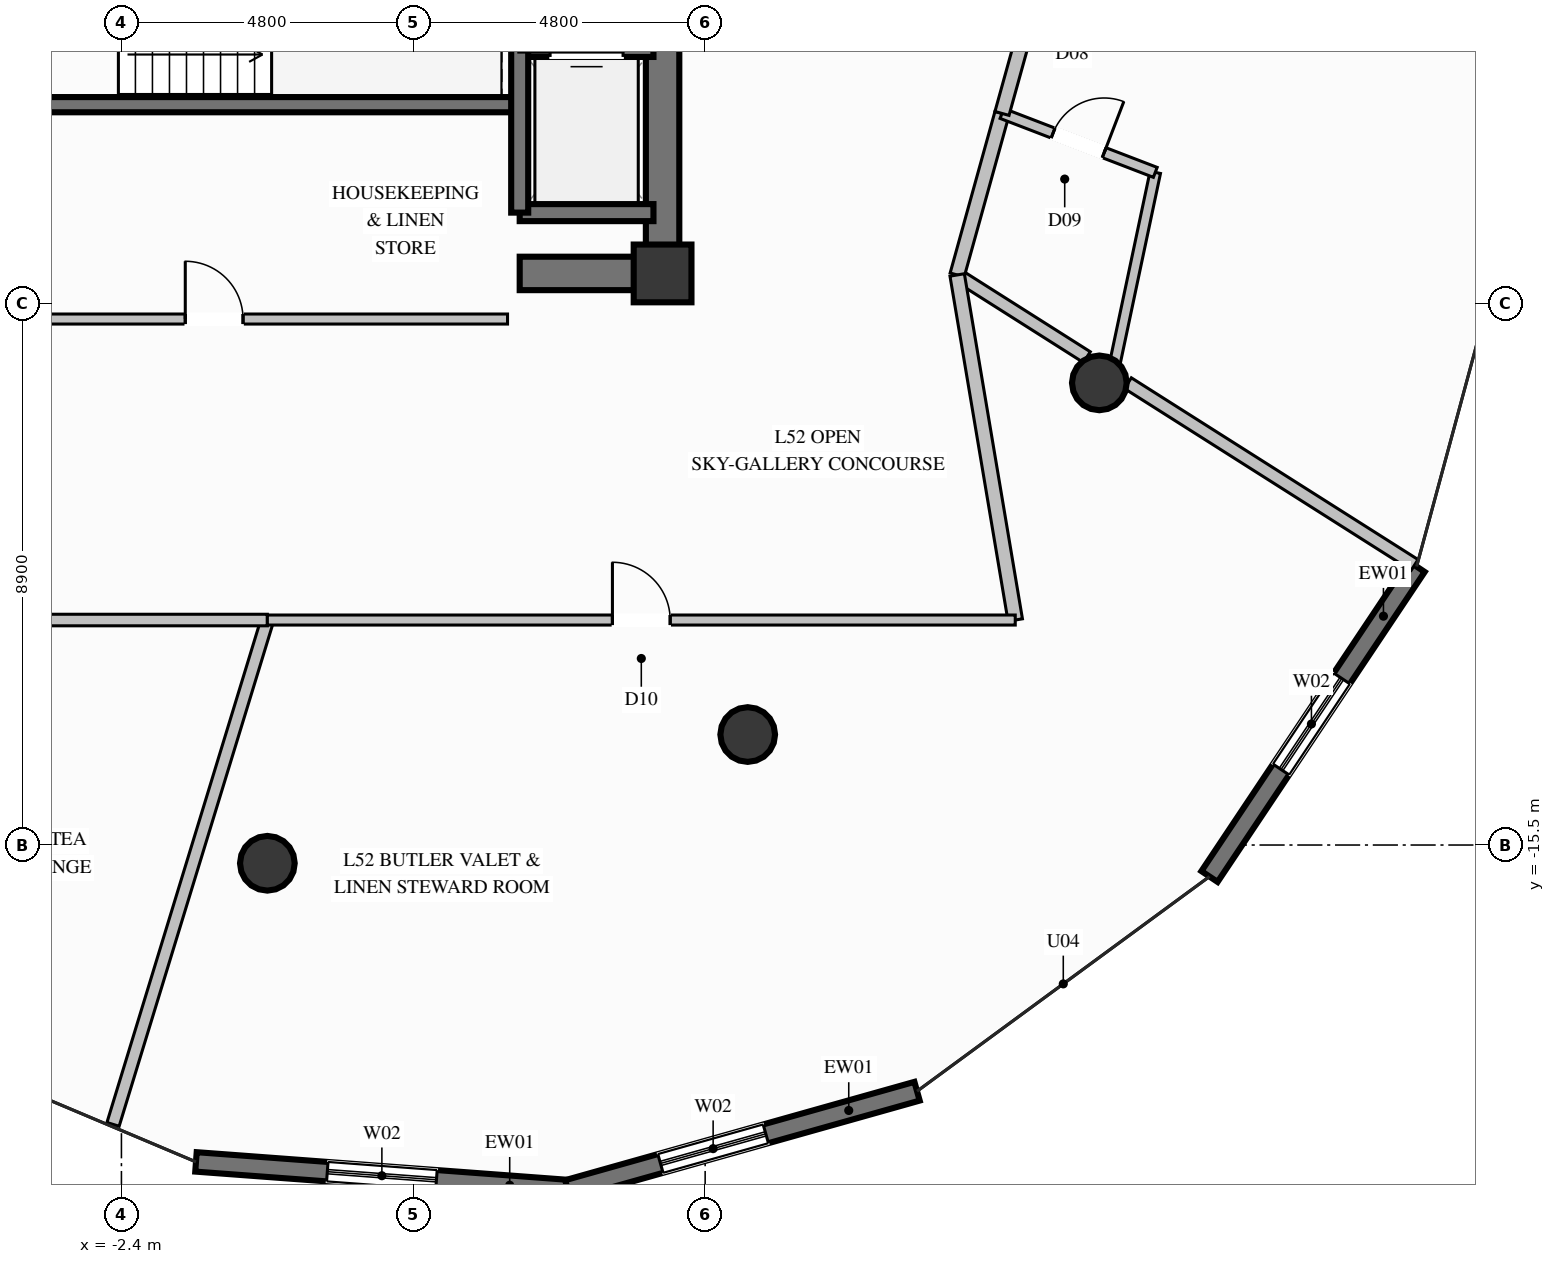
"""IFC4 building model, lengths in metres.
Left out: names, types, materials, properties, quantities, classifications, styles, units other than length and angle.
Written with IfcOpenShell. Run it as: python <this file> out.ifc"""

import sys

from ifc_helpers import new_model, si_unit, direction, frame, frame_2d, origin, origin_2d, place, context, subcontext, project, spatial, rectangle, circle, extrude, element, fill, save


model = new_model("IFC4")
c1 = context("Model", 3, precision=1e-05, world=origin(), true_north=direction((0.0, 1.0)))
c2 = subcontext(c1, "Body", "Model", "MODEL_VIEW")
j1 = project(units=[si_unit("LENGTHUNIT", "METRE"), si_unit("PLANEANGLEUNIT", "RADIAN")], contexts=[c1])
p1 = place(None, origin())
s1 = spatial("IfcSite", under=j1, at=p1, CompositionType="ELEMENT")
p2 = place(p1, origin())
s2 = spatial("IfcBuilding", under=s1, at=p2, CompositionType="ELEMENT")
p3 = place(p2, frame((0.0, 0.0, 202.0)))
s3 = spatial("IfcBuildingStorey", under=s2, at=p3, CompositionType="ELEMENT", Elevation=202.0)
p4 = place(p3, frame((6.5, -6.1, 0.0), z_axis=(0.0, 0.0, 1.0), x_axis=(1.0, 0.0, 0.0)))
e1 = element("IfcColumn", 1, at=p4, inside=s3, PredefinedType="COLUMN", context=c2, shape_type="SweptSolid", body=[
    extrude(rectangle(XDim=0.95, YDim=0.95, at=origin_2d()), origin(), (0.0, 0.0, 1.0), 3.6),
])
p5 = place(p3, frame((-4.13, -3.325, 0.0), z_axis=(0.0, 0.0, 1.0), x_axis=(1.0, 0.0, 0.0)))
e2 = element("IfcWall", 2, at=p5, inside=s3, PredefinedType="SOLIDWALL", context=c2, shape_type="SweptSolid", body=[
    extrude(rectangle(XDim=8.26, YDim=0.25, at=frame_2d((4.13, 0.0))), origin(), (0.0, 0.0, 1.0), 3.6),
])
p6 = place(p3, frame((4.15, -6.1, 0.0), z_axis=(0.0, 0.0, 1.0), x_axis=(1.0, 0.0, 0.0)))
e3 = element("IfcWall", 3, at=p6, inside=s3, PredefinedType="SHEAR", context=c2, shape_type="SweptSolid", body=[
    extrude(rectangle(XDim=2.075, YDim=0.55, at=frame_2d((1.038, 0.0))), origin(), (0.0, 0.0, 1.0), 3.6),
])
p7 = place(p3, frame((6.5, -6.375, 0.0), z_axis=(0.0, 0.0, 1.0), x_axis=(0.0, 1.0, 0.0)))
e4 = element("IfcWall", 4, at=p7, inside=s3, PredefinedType="SHEAR", context=c2, shape_type="SweptSolid", body=[
    extrude(rectangle(XDim=4.025, YDim=0.55, at=frame_2d((2.012, 0.0))), origin(), (0.0, 0.0, 1.0), 3.6),
])
for number, where, z_axis, x_axis in (
    (5, (0.0, -15.8, 0.0), (0.0, 0.0, 1.0), (1.0, 0.0, 0.0)),
    (6, (7.9, -13.683, 0.0), (0.0, 0.0, 1.0), (1.0, 0.0, 0.0)),
    (7, (13.683, -7.9, 0.0), (0.0, 0.0, 1.0), (1.0, 0.0, 0.0)),
):
    element("IfcColumn", number, at=place(p3, frame(where, z_axis=z_axis, x_axis=x_axis)), inside=s3, PredefinedType="COLUMN", context=c2, shape_type="SweptSolid", body=[
        extrude(circle(Radius=0.45, at=origin_2d()), origin(), (0.0, 0.0, 1.0), 3.6),
    ])
p8 = place(p3, frame((18.901, -10.92, 0.0), z_axis=(0.0, 0.0, 1.0), x_axis=(-0.55549022161, -0.831523068649, 0.0)))
e8 = element("IfcWall", 8, at=p8, inside=s3, PredefinedType="SOLIDWALL", context=c2, shape_type="SweptSolid", body=[
    extrude(rectangle(XDim=6.131, YDim=0.32, at=frame_2d((3.065, 0.0))), origin(), (0.0, 0.0, 1.0), 3.36),
])
p9 = place(p8, frame((2.214, 0.0, 0.35)))
e9 = element("IfcOpeningElement", 9, at=p9, cuts=e8, PredefinedType="OPENING", context=c2, shape_type="SweptSolid", body=[
    extrude(rectangle(XDim=1.8, YDim=2.6, at=frame_2d((0.9, 1.3))), frame((0.0, 0.17, 0.0), z_axis=(0.0, -1.0, 0.0), x_axis=(1.0, 0.0, 0.0)), (0.0, 0.0, 1.0), 0.34),
])
p10 = place(p3, frame((4.941, -21.166, 0.0), z_axis=(0.0, 0.0, 1.0), x_axis=(-0.997242274748, 0.074214860068, 0.0)))
e10 = element("IfcWall", 10, at=p10, inside=s3, PredefinedType="SOLIDWALL", context=c2, shape_type="SweptSolid", body=[
    extrude(rectangle(XDim=6.132, YDim=0.32, at=frame_2d((3.066, 0.0))), origin(), (0.0, 0.0, 1.0), 3.36),
])
p11 = place(p10, frame((2.166, 0.0, 0.35)))
e11 = element("IfcOpeningElement", 11, at=p11, cuts=e10, PredefinedType="OPENING", context=c2, shape_type="SweptSolid", body=[
    extrude(rectangle(XDim=1.8, YDim=2.6, at=frame_2d((0.9, 1.3))), frame((0.0, 0.17, 0.0), z_axis=(0.0, -1.0, 0.0), x_axis=(1.0, 0.0, 0.0)), (0.0, 0.0, 1.0), 0.34),
])
p12 = place(p3, frame((10.685, -19.549, 0.0), z_axis=(0.0, 0.0, 1.0), x_axis=(-0.962589602237, -0.270963572578, 0.0)))
e12 = element("IfcWall", 12, at=p12, inside=s3, PredefinedType="SOLIDWALL", context=c2, shape_type="SweptSolid", body=[
    extrude(rectangle(XDim=5.967, YDim=0.32, at=frame_2d((2.984, 0.0))), origin(), (0.0, 0.0, 1.0), 3.36),
])
p13 = place(p12, frame((2.584, 0.0, 0.35)))
e13 = element("IfcOpeningElement", 13, at=p13, cuts=e12, PredefinedType="OPENING", context=c2, shape_type="SweptSolid", body=[
    extrude(rectangle(XDim=1.8, YDim=2.6, at=frame_2d((0.9, 1.3))), frame((0.0, 0.17, 0.0), z_axis=(0.0, -1.0, 0.0), x_axis=(1.0, 0.0, 0.0)), (0.0, 0.0, 1.0), 0.34),
])
p14 = place(p3, frame((4.15, -5.1, 0.0), z_axis=(0.0, 0.0, 1.0), x_axis=(1.0, 0.0, 0.0)))
e14 = element("IfcWall", 14, at=p14, inside=s3, PredefinedType="SOLIDWALL", context=c2, shape_type="SweptSolid", body=[
    extrude(rectangle(XDim=2.2, YDim=0.28, at=frame_2d((1.1, 0.0))), origin(), (0.0, 0.0, 1.0), 3.36),
])
p15 = place(p3, frame((6.35, -2.4, 0.0), z_axis=(0.0, 0.0, 1.0), x_axis=(-1.0, 0.0, 0.0)))
e15 = element("IfcWall", 15, at=p15, inside=s3, PredefinedType="SOLIDWALL", context=c2, shape_type="SweptSolid", body=[
    extrude(rectangle(XDim=2.2, YDim=0.28, at=frame_2d((1.1, 0.0))), origin(), (0.0, 0.0, 1.0), 3.36),
])
p16 = place(p15, frame((0.5, 0.0, 0.0)))
e16 = element("IfcOpeningElement", 16, at=p16, cuts=e15, PredefinedType="OPENING", context=c2, shape_type="SweptSolid", body=[
    extrude(rectangle(XDim=1.2, YDim=2.2, at=frame_2d((0.6, 1.1))), frame((0.0, 0.15, 0.0), z_axis=(0.0, -1.0, 0.0), x_axis=(1.0, 0.0, 0.0)), (0.0, 0.0, 1.0), 0.3),
])
p17 = place(p3, frame((4.15, -2.4, 0.0), z_axis=(0.0, 0.0, 1.0), x_axis=(0.0, -1.0, 0.0)))
e17 = element("IfcWall", 17, at=p17, inside=s3, PredefinedType="SOLIDWALL", context=c2, shape_type="SweptSolid", body=[
    extrude(rectangle(XDim=2.7, YDim=0.28, at=frame_2d((1.35, 0.0))), origin(), (0.0, 0.0, 1.0), 3.36),
])
p18 = place(p3, frame((-5.7, -6.85, 0.0), z_axis=(0.0, 0.0, 1.0), x_axis=(1.0, 0.0, 0.0)))
e18 = element("IfcWall", 18, at=p18, inside=s3, PredefinedType="PARTITIONING", context=c2, shape_type="SweptSolid", body=[
    extrude(rectangle(XDim=9.65, YDim=0.165, at=frame_2d((4.825, 0.0))), origin(), (0.0, 0.0, 1.0), 2.445),
])
p19 = place(p18, frame((4.35, 0.0, 0.0)))
e19 = element("IfcOpeningElement", 19, at=p19, cuts=e18, PredefinedType="OPENING", context=c2, shape_type="SweptSolid", body=[
    extrude(rectangle(XDim=0.95, YDim=2.1, at=frame_2d((0.475, 1.05))), frame((0.0, 0.093, 0.0), z_axis=(0.0, -1.0, 0.0), x_axis=(1.0, 0.0, 0.0)), (0.0, 0.0, 1.0), 0.185),
])
p20 = place(p3, frame((11.345, -6.125, 0.0), z_axis=(0.0, 0.0, 1.0), x_axis=(0.844619463995, -0.535367127344, 0.0)))
e20 = element("IfcWall", 20, at=p20, inside=s3, PredefinedType="PARTITIONING", context=c2, shape_type="SweptSolid", body=[
    extrude(rectangle(XDim=2.525, YDim=0.21, at=frame_2d((1.263, 0.0))), origin(), (0.0, 0.0, 1.0), 2.801),
])
p21 = place(p3, frame((14.153, -7.905, 0.0), z_axis=(0.0, 0.0, 1.0), x_axis=(0.844580451792, -0.535428669806, 0.0)))
e21 = element("IfcWall", 21, at=p21, inside=s3, PredefinedType="PARTITIONING", context=c2, shape_type="SweptSolid", body=[
    extrude(rectangle(XDim=5.583, YDim=0.21, at=frame_2d((2.791, 0.0))), origin(), (0.0, 0.0, 1.0), 3.36),
])
p22 = place(p3, frame((11.345, -6.125, 0.0), z_axis=(0.0, 0.0, 1.0), x_axis=(0.267401739017, 0.963585133743, 0.0)))
e22 = element("IfcWall", 22, at=p22, inside=s3, PredefinedType="PARTITIONING", context=c2, shape_type="SweptSolid", body=[
    extrude(rectangle(XDim=2.756, YDim=0.24, at=frame_2d((1.378, 0.0))), origin(), (0.0, 0.0, 1.0), 3.36),
])
p23 = place(p3, frame((13.903, -7.746, 0.0), z_axis=(0.0, 0.0, 1.0), x_axis=(0.207003777915, 0.978340143268, 0.0)))
e23 = element("IfcWall", 23, at=p23, inside=s3, PredefinedType="PLUMBINGWALL", context=c2, shape_type="SweptSolid", body=[
    extrude(rectangle(XDim=3.381, YDim=0.175, at=frame_2d((1.691, 0.0))), origin(), (0.0, 0.0, 1.0), 2.929),
])
p24 = place(p3, frame((12.082, -3.469, 0.0), z_axis=(0.0, 0.0, 1.0), x_axis=(0.933422467447, -0.358779176186, 0.0)))
e24 = element("IfcWall", 24, at=p24, inside=s3, PredefinedType="PLUMBINGWALL", context=c2, shape_type="SweptSolid", body=[
    extrude(rectangle(XDim=2.701, YDim=0.175, at=frame_2d((1.351, 0.0))), origin(), (0.0, 0.0, 1.0), 3.36),
])
p25 = place(p24, frame((0.9, 0.0, 0.0)))
e25 = element("IfcOpeningElement", 25, at=p25, cuts=e24, PredefinedType="OPENING", context=c2, shape_type="SweptSolid", body=[
    extrude(rectangle(XDim=0.9, YDim=2.1, at=frame_2d((0.45, 1.05))), frame((0.0, 0.098, 0.0), z_axis=(0.0, -1.0, 0.0), x_axis=(1.0, 0.0, 0.0)), (0.0, 0.0, 1.0), 0.195),
])
p26 = place(p3, frame((12.082, -3.469, 0.0), z_axis=(0.0, 0.0, 1.0), x_axis=(0.267379290897, 0.963591362975, 0.0)))
e26 = element("IfcWall", 26, at=p26, inside=s3, PredefinedType="PARTITIONING", context=c2, shape_type="SweptSolid", body=[
    extrude(rectangle(XDim=3.808, YDim=0.24, at=frame_2d((1.904, 0.0))), origin(), (0.0, 0.0, 1.0), 3.36),
])
p27 = place(p26, frame((1.354, 0.0, 0.0)))
e27 = element("IfcOpeningElement", 27, at=p27, cuts=e26, PredefinedType="OPENING", context=c2, shape_type="SweptSolid", body=[
    extrude(rectangle(XDim=1.1, YDim=2.3, at=frame_2d((0.55, 1.15))), frame((0.0, 0.13, 0.0), z_axis=(0.0, -1.0, 0.0), x_axis=(1.0, 0.0, 0.0)), (0.0, 0.0, 1.0), 0.26),
])
p28 = place(p3, frame((0.0, -11.8, 0.0), z_axis=(0.0, 0.0, 1.0), x_axis=(-0.292621831888, -0.956228248643, 0.0)))
e28 = element("IfcWall", 28, at=p28, inside=s3, PredefinedType="PARTITIONING", context=c2, shape_type="SweptSolid", body=[
    extrude(rectangle(XDim=8.674, YDim=0.21, at=frame_2d((4.337, 0.0))), origin(), (0.0, 0.0, 1.0), 3.36),
])
p29 = place(p3, frame((-12.3, -11.8, 0.0), z_axis=(0.0, 0.0, 1.0), x_axis=(1.0, 0.0, 0.0)))
e29 = element("IfcWall", 29, at=p29, inside=s3, PredefinedType="PARTITIONING", context=c2, shape_type="SweptSolid", body=[
    extrude(rectangle(XDim=12.3, YDim=0.19, at=frame_2d((6.15, 0.0))), origin(), (0.0, 0.0, 1.0), 3.36),
])
p30 = place(p29, frame((5.675, 0.0, 0.0)))
e30 = element("IfcOpeningElement", 30, at=p30, cuts=e29, PredefinedType="OPENING", context=c2, shape_type="SweptSolid", body=[
    extrude(rectangle(XDim=0.95, YDim=2.1, at=frame_2d((0.475, 1.05))), frame((0.0, 0.105, 0.0), z_axis=(0.0, -1.0, 0.0), x_axis=(1.0, 0.0, 0.0)), (0.0, 0.0, 1.0), 0.21),
])
p31 = place(p3, frame((12.3, -11.8, 0.0), z_axis=(0.0, 0.0, 1.0), x_axis=(-0.165960421789, 0.986132414232, 0.0)))
e31 = element("IfcWall", 31, at=p31, inside=s3, PredefinedType="PARTITIONING", context=c2, shape_type="SweptSolid", body=[
    extrude(rectangle(XDim=5.755, YDim=0.24, at=frame_2d((2.877, 0.0))), origin(), (0.0, 0.0, 1.0), 3.36),
])
p32 = place(p3, frame((0.0, -11.8, 0.0), z_axis=(0.0, 0.0, 1.0), x_axis=(1.0, 0.0, 0.0)))
e32 = element("IfcWall", 32, at=p32, inside=s3, PredefinedType="PARTITIONING", context=c2, shape_type="SweptSolid", body=[
    extrude(rectangle(XDim=12.3, YDim=0.165, at=frame_2d((6.15, 0.0))), origin(), (0.0, 0.0, 1.0), 3.36),
])
p33 = place(p32, frame((5.675, 0.0, 0.0)))
e33 = element("IfcOpeningElement", 33, at=p33, cuts=e32, PredefinedType="OPENING", context=c2, shape_type="SweptSolid", body=[
    extrude(rectangle(XDim=0.95, YDim=2.1, at=frame_2d((0.475, 1.05))), frame((0.0, 0.093, 0.0), z_axis=(0.0, -1.0, 0.0), x_axis=(1.0, 0.0, 0.0)), (0.0, 0.0, 1.0), 0.185),
])
p34 = place(p9, origin())
e34 = element("IfcWindow", 34, at=p34, inside=s3, PartitioningType="SINGLE_PANEL", PredefinedType="WINDOW", context=c2, shape_type="SweptSolid", body=[
    extrude(rectangle(XDim=1.8, YDim=2.6, at=frame_2d((0.9, 1.3))), frame((0.0, 0.03, 0.0), z_axis=(0.0, -1.0, 0.0), x_axis=(1.0, 0.0, 0.0)), (0.0, 0.0, 1.0), 0.06),
])
fill(e9, e34)
p35 = place(p11, origin())
e35 = element("IfcWindow", 35, at=p35, inside=s3, PartitioningType="SINGLE_PANEL", PredefinedType="WINDOW", context=c2, shape_type="SweptSolid", body=[
    extrude(rectangle(XDim=1.8, YDim=2.6, at=frame_2d((0.9, 1.3))), frame((0.0, 0.03, 0.0), z_axis=(0.0, -1.0, 0.0), x_axis=(1.0, 0.0, 0.0)), (0.0, 0.0, 1.0), 0.06),
])
fill(e11, e35)
p36 = place(p13, origin())
e36 = element("IfcWindow", 36, at=p36, inside=s3, PartitioningType="SINGLE_PANEL", PredefinedType="WINDOW", context=c2, shape_type="SweptSolid", body=[
    extrude(rectangle(XDim=1.8, YDim=2.6, at=frame_2d((0.9, 1.3))), frame((0.0, 0.03, 0.0), z_axis=(0.0, -1.0, 0.0), x_axis=(1.0, 0.0, 0.0)), (0.0, 0.0, 1.0), 0.06),
])
fill(e13, e36)
p37 = place(p19, origin())
e37 = element("IfcDoor", 37, at=p37, inside=s3, OperationType="SINGLE_SWING_LEFT", PredefinedType="DOOR", context=c2, shape_type="SweptSolid", body=[
    extrude(rectangle(XDim=0.95, YDim=2.1, at=frame_2d((0.475, 1.05))), frame((0.0, 0.025, 0.0), z_axis=(0.0, -1.0, 0.0), x_axis=(1.0, 0.0, 0.0)), (0.0, 0.0, 1.0), 0.05),
])
fill(e19, e37)
p38 = place(p25, origin())
e38 = element("IfcDoor", 38, at=p38, inside=s3, OperationType="SINGLE_SWING_RIGHT", PredefinedType="DOOR", context=c2, shape_type="SweptSolid", body=[
    extrude(rectangle(XDim=0.9, YDim=2.1, at=frame_2d((0.45, 1.05))), frame((0.0, 0.025, 0.0), z_axis=(0.0, -1.0, 0.0), x_axis=(1.0, 0.0, 0.0)), (0.0, 0.0, 1.0), 0.05),
])
fill(e25, e38)
p39 = place(p33, origin())
e39 = element("IfcDoor", 39, at=p39, inside=s3, OperationType="SINGLE_SWING_LEFT", PredefinedType="DOOR", context=c2, shape_type="SweptSolid", body=[
    extrude(rectangle(XDim=0.95, YDim=2.1, at=frame_2d((0.475, 1.05))), frame((0.0, 0.025, 0.0), z_axis=(0.0, -1.0, 0.0), x_axis=(1.0, 0.0, 0.0)), (0.0, 0.0, 1.0), 0.05),
])
fill(e33, e39)
save(model, sys.argv[1])
